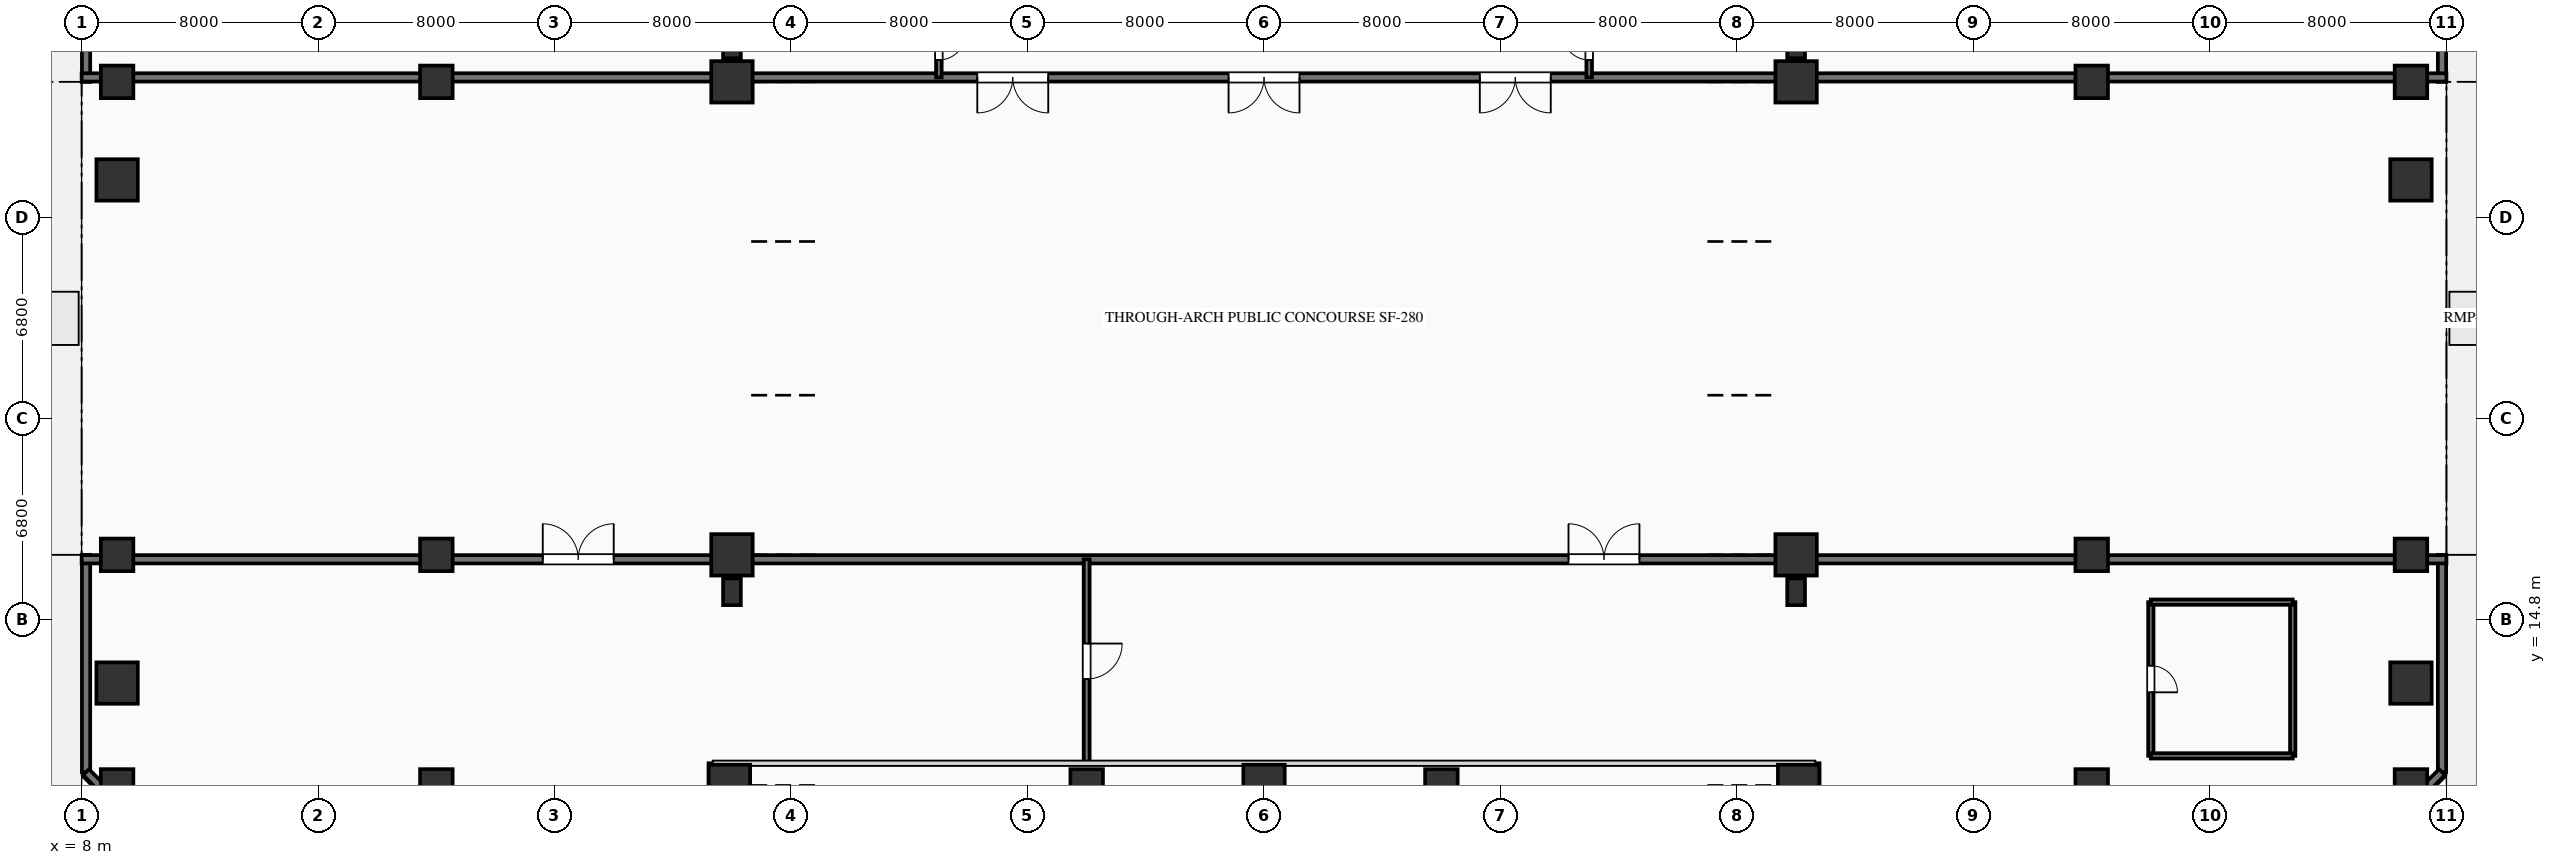
"""IFC4 building model, lengths in metres.
Left out: names, types, materials, properties, quantities, classifications, styles, units other than length and angle.
Written with IfcOpenShell. Run it as: python <this file> out.ifc"""

import sys

from ifc_helpers import new_model, si_unit, direction, frame, frame_2d, origin, origin_2d, place, context, subcontext, project, spatial, rectangle, extrude, element, fill, save


model = new_model("IFC4")
c1 = context("Model", 3, precision=1e-05, world=origin(), true_north=direction((0.0, 1.0)))
c2 = subcontext(c1, "Body", "Model", "MODEL_VIEW")
j1 = project(units=[si_unit("LENGTHUNIT", "METRE"), si_unit("PLANEANGLEUNIT", "RADIAN")], contexts=[c1])
p1 = place(None, origin())
s1 = spatial("IfcSite", under=j1, at=p1, CompositionType="ELEMENT")
p2 = place(p1, origin())
s2 = spatial("IfcBuilding", under=s1, at=p2, CompositionType="ELEMENT")
p3 = place(p2, origin())
s3 = spatial("IfcBuildingStorey", under=s2, at=p3, CompositionType="ELEMENT", Elevation=0.0)
for number, where, z_axis, x_axis in (
    (1, (9.2, 9.2, 0.0), (0.0, 0.0, 1.0), (1.0, 0.0, 0.0)),
    (2, (20.0, 9.2, 0.0), (0.0, 0.0, 1.0), (1.0, 0.0, 0.0)),
    (3, (42.0, 9.2, 0.0), (0.0, 0.0, 1.0), (1.0, 0.0, 0.0)),
    (4, (54.0, 9.2, 0.0), (0.0, 0.0, 1.0), (1.0, 0.0, 0.0)),
    (5, (76.0, 9.2, 0.0), (0.0, 0.0, 1.0), (1.0, 0.0, 0.0)),
    (6, (86.8, 9.2, 0.0), (0.0, 0.0, 1.0), (1.0, 0.0, 0.0)),
    (7, (9.2, 17.0, 0.0), (0.0, 0.0, 1.0), (1.0, 0.0, 0.0)),
    (8, (86.8, 17.0, 0.0), (0.0, 0.0, 1.0), (1.0, 0.0, 0.0)),
    (9, (9.2, 33.0, 0.0), (0.0, 0.0, 1.0), (1.0, 0.0, 0.0)),
    (10, (86.8, 33.0, 0.0), (0.0, 0.0, 1.0), (1.0, 0.0, 0.0)),
    (11, (20.0, 17.0, 0.0), (0.0, 0.0, 1.0), (1.0, 0.0, 0.0)),
):
    element("IfcColumn", number, at=place(p3, frame(where, z_axis=z_axis, x_axis=x_axis)), inside=s3, PredefinedType="COLUMN", context=c2, shape_type="SweptSolid", body=[
        extrude(rectangle(XDim=1.1, YDim=1.1, at=origin_2d()), origin(), (0.0, 0.0, 1.0), 5.72),
    ])
for number, where, z_axis, x_axis in (
    (12, (30.0, 17.0, 0.0), (0.0, 0.0, 1.0), (1.0, 0.0, 0.0)),
    (13, (66.0, 17.0, 0.0), (0.0, 0.0, 1.0), (1.0, 0.0, 0.0)),
):
    element("IfcColumn", number, at=place(p3, frame(where, z_axis=z_axis, x_axis=x_axis)), inside=s3, PredefinedType="COLUMN", context=c2, shape_type="SweptSolid", body=[
        extrude(rectangle(XDim=1.4, YDim=1.4, at=origin_2d()), origin(), (0.0, 0.0, 1.0), 5.72),
    ])
for number, where, z_axis, x_axis in (
    (14, (76.0, 17.0, 0.0), (0.0, 0.0, 1.0), (1.0, 0.0, 0.0)),
    (15, (20.0, 33.0, 0.0), (0.0, 0.0, 1.0), (1.0, 0.0, 0.0)),
):
    element("IfcColumn", number, at=place(p3, frame(where, z_axis=z_axis, x_axis=x_axis)), inside=s3, PredefinedType="COLUMN", context=c2, shape_type="SweptSolid", body=[
        extrude(rectangle(XDim=1.1, YDim=1.1, at=origin_2d()), origin(), (0.0, 0.0, 1.0), 5.72),
    ])
for number, where, z_axis, x_axis in (
    (16, (30.0, 33.0, 0.0), (0.0, 0.0, 1.0), (1.0, 0.0, 0.0)),
    (17, (66.0, 33.0, 0.0), (0.0, 0.0, 1.0), (1.0, 0.0, 0.0)),
):
    element("IfcColumn", number, at=place(p3, frame(where, z_axis=z_axis, x_axis=x_axis)), inside=s3, PredefinedType="COLUMN", context=c2, shape_type="SweptSolid", body=[
        extrude(rectangle(XDim=1.4, YDim=1.4, at=origin_2d()), origin(), (0.0, 0.0, 1.0), 5.72),
    ])
p4 = place(p3, frame((76.0, 33.0, 0.0), z_axis=(0.0, 0.0, 1.0), x_axis=(1.0, 0.0, 0.0)))
e18 = element("IfcColumn", 18, at=p4, inside=s3, PredefinedType="COLUMN", context=c2, shape_type="SweptSolid", body=[
    extrude(rectangle(XDim=1.1, YDim=1.1, at=origin_2d()), origin(), (0.0, 0.0, 1.0), 5.72),
])
p5 = place(p3, frame((9.2, 29.682, 0.0), z_axis=(0.0, 0.0, 1.0), x_axis=(1.0, 0.0, 0.0)))
e19 = element("IfcColumn", 19, at=p5, inside=s3, PredefinedType="COLUMN", context=c2, shape_type="SweptSolid", body=[
    extrude(rectangle(XDim=1.4, YDim=1.4, at=origin_2d()), origin(), (0.0, 0.0, 1.0), 6.0),
])
for number, where, z_axis, x_axis in (
    (20, (9.2, 12.663, 0.0), (0.0, 0.0, 1.0), (1.0, 0.0, 0.0)),
    (21, (29.916, 9.2, 0.0), (0.0, 0.0, 1.0), (1.0, 0.0, 0.0)),
    (22, (48.0, 9.2, 0.0), (0.0, 0.0, 1.0), (1.0, 0.0, 0.0)),
    (23, (66.084, 9.2, 0.0), (0.0, 0.0, 1.0), (1.0, 0.0, 0.0)),
    (24, (86.8, 12.663, 0.0), (0.0, 0.0, 1.0), (1.0, 0.0, 0.0)),
):
    element("IfcColumn", number, at=place(p3, frame(where, z_axis=z_axis, x_axis=x_axis)), inside=s3, PredefinedType="COLUMN", context=c2, shape_type="SweptSolid", body=[
        extrude(rectangle(XDim=1.4, YDim=1.4, at=origin_2d()), origin(), (0.0, 0.0, 1.0), 5.72),
    ])
p6 = place(p3, frame((86.8, 29.682, 0.0), z_axis=(0.0, 0.0, 1.0), x_axis=(1.0, 0.0, 0.0)))
e25 = element("IfcColumn", 25, at=p6, inside=s3, PredefinedType="COLUMN", context=c2, shape_type="SweptSolid", body=[
    extrude(rectangle(XDim=1.4, YDim=1.4, at=origin_2d()), origin(), (0.0, 0.0, 1.0), 6.0),
])
for number, where, z_axis, x_axis in (
    (26, (30.0, 15.75, 0.0), (0.0, 0.0, 1.0), (1.0, 0.0, 0.0)),
    (27, (30.0, 34.25, 0.0), (0.0, 0.0, 1.0), (1.0, 0.0, 0.0)),
    (28, (66.0, 15.75, 0.0), (0.0, 0.0, 1.0), (1.0, 0.0, 0.0)),
    (29, (66.0, 34.25, 0.0), (0.0, 0.0, 1.0), (1.0, 0.0, 0.0)),
):
    element("IfcColumn", number, at=place(p3, frame(where, z_axis=z_axis, x_axis=x_axis)), inside=s3, PredefinedType="PILASTER", context=c2, shape_type="SweptSolid", body=[
        extrude(rectangle(XDim=0.6, YDim=0.9, at=origin_2d()), origin(), (0.0, 0.0, 1.0), 5.72),
    ])
for number, where, z_axis, x_axis in (
    (30, (29.35, 8.15, 0.0), (0.0, 0.0, 1.0), (0.0, 1.0, 0.0)),
    (31, (66.65, 9.95, 0.0), (0.0, 0.0, 1.0), (0.0, -1.0, 0.0)),
):
    element("IfcWall", number, at=place(p3, frame(where, z_axis=z_axis, x_axis=x_axis)), inside=s3, PredefinedType="SOLIDWALL", context=c2, shape_type="SweptSolid", body=[
        extrude(rectangle(XDim=1.8, YDim=0.28, at=frame_2d((0.9, 0.0))), origin(), (0.0, 0.0, 1.0), 5.72),
    ])
p7 = place(p3, frame((8.15, 33.0, 0.0), z_axis=(0.0, 0.0, 1.0), x_axis=(0.0, 1.0, 0.0)))
e32 = element("IfcWall", 32, at=p7, inside=s3, PredefinedType="SOLIDWALL", context=c2, shape_type="SweptSolid", body=[
    extrude(rectangle(XDim=41.35, YDim=0.28, at=frame_2d((20.675, 0.0))), origin(), (0.0, 0.0, 1.0), 5.72),
])
p8 = place(p7, frame((33.6, 0.0, 0.0)))
e33 = element("IfcOpeningElement", 33, at=p8, cuts=e32, PredefinedType="OPENING", context=c2, shape_type="SweptSolid", body=[
    extrude(rectangle(XDim=2.4, YDim=2.6, at=frame_2d((1.2, 1.3))), frame((0.0, 0.15, 0.0), z_axis=(0.0, -1.0, 0.0), x_axis=(1.0, 0.0, 0.0)), (0.0, 0.0, 1.0), 0.3),
])
p9 = place(p7, frame((7.675, 0.0, 0.9)))
e34 = element("IfcOpeningElement", 34, at=p9, cuts=e32, PredefinedType="OPENING", context=c2, shape_type="SweptSolid", body=[
    extrude(rectangle(XDim=2.4, YDim=2.6, at=frame_2d((1.2, 1.3))), frame((0.0, 0.15, 0.0), z_axis=(0.0, -1.0, 0.0), x_axis=(1.0, 0.0, 0.0)), (0.0, 0.0, 1.0), 0.3),
])
p10 = place(p7, frame((21.225, 0.0, 0.9)))
e35 = element("IfcOpeningElement", 35, at=p10, cuts=e32, PredefinedType="OPENING", context=c2, shape_type="SweptSolid", body=[
    extrude(rectangle(XDim=2.4, YDim=2.6, at=frame_2d((1.2, 1.3))), frame((0.0, 0.15, 0.0), z_axis=(0.0, -1.0, 0.0), x_axis=(1.0, 0.0, 0.0)), (0.0, 0.0, 1.0), 0.3),
])
p11 = place(p3, frame((87.85, 74.35, 0.0), z_axis=(0.0, 0.0, 1.0), x_axis=(0.0, -1.0, 0.0)))
e36 = element("IfcWall", 36, at=p11, inside=s3, PredefinedType="SOLIDWALL", context=c2, shape_type="SweptSolid", body=[
    extrude(rectangle(XDim=41.35, YDim=0.28, at=frame_2d((20.675, 0.0))), origin(), (0.0, 0.0, 1.0), 5.72),
])
p12 = place(p11, frame((5.35, 0.0, 0.0)))
e37 = element("IfcOpeningElement", 37, at=p12, cuts=e36, PredefinedType="OPENING", context=c2, shape_type="SweptSolid", body=[
    extrude(rectangle(XDim=2.4, YDim=2.6, at=frame_2d((1.2, 1.3))), frame((0.0, 0.15, 0.0), z_axis=(0.0, -1.0, 0.0), x_axis=(1.0, 0.0, 0.0)), (0.0, 0.0, 1.0), 0.3),
])
p13 = place(p11, frame((14.15, 0.0, 0.0)))
e38 = element("IfcOpeningElement", 38, at=p13, cuts=e36, PredefinedType="OPENING", context=c2, shape_type="SweptSolid", body=[
    extrude(rectangle(XDim=4.2, YDim=4.2, at=frame_2d((2.1, 2.1))), frame((0.0, 0.15, 0.0), z_axis=(0.0, -1.0, 0.0), x_axis=(1.0, 0.0, 0.0)), (0.0, 0.0, 1.0), 0.3),
])
p14 = place(p11, frame((31.275, 0.0, 0.9)))
e39 = element("IfcOpeningElement", 39, at=p14, cuts=e36, PredefinedType="OPENING", context=c2, shape_type="SweptSolid", body=[
    extrude(rectangle(XDim=2.4, YDim=2.6, at=frame_2d((1.2, 1.3))), frame((0.0, 0.15, 0.0), z_axis=(0.0, -1.0, 0.0), x_axis=(1.0, 0.0, 0.0)), (0.0, 0.0, 1.0), 0.3),
])
for number, where, z_axis, x_axis in (
    (40, (8.15, 17.0, 0.0), (0.0, 0.0, 1.0), (0.0, -1.0, 0.0)),
    (41, (87.85, 9.65, 0.0), (0.0, 0.0, 1.0), (0.0, 1.0, 0.0)),
):
    element("IfcWall", number, at=place(p3, frame(where, z_axis=z_axis, x_axis=x_axis)), inside=s3, PredefinedType="SOLIDWALL", context=c2, shape_type="SweptSolid", body=[
        extrude(rectangle(XDim=7.35, YDim=0.28, at=frame_2d((3.675, 0.0))), origin(), (0.0, 0.0, 1.0), 5.72),
    ])
p15 = place(p3, frame((88.0, 33.15, 0.0), z_axis=(0.0, 0.0, 1.0), x_axis=(-1.0, 0.0, 0.0)))
e42 = element("IfcWall", 42, at=p15, inside=s3, PredefinedType="SOLIDWALL", context=c2, shape_type="SweptSolid", body=[
    extrude(rectangle(XDim=80.0, YDim=0.28, at=frame_2d((40.0, 0.0))), origin(), (0.0, 0.0, 1.0), 5.72),
])
p16 = place(p15, frame((47.3, 0.0, 0.0)))
e43 = element("IfcOpeningElement", 43, at=p16, cuts=e42, PredefinedType="OPENING", context=c2, shape_type="SweptSolid", body=[
    extrude(rectangle(XDim=2.4, YDim=2.6, at=frame_2d((1.2, 1.3))), frame((0.0, 0.15, 0.0), z_axis=(0.0, -1.0, 0.0), x_axis=(1.0, 0.0, 0.0)), (0.0, 0.0, 1.0), 0.3),
])
p17 = place(p15, frame((38.8, 0.0, 0.0)))
e44 = element("IfcOpeningElement", 44, at=p17, cuts=e42, PredefinedType="OPENING", context=c2, shape_type="SweptSolid", body=[
    extrude(rectangle(XDim=2.4, YDim=2.6, at=frame_2d((1.2, 1.3))), frame((0.0, 0.15, 0.0), z_axis=(0.0, -1.0, 0.0), x_axis=(1.0, 0.0, 0.0)), (0.0, 0.0, 1.0), 0.3),
])
p18 = place(p15, frame((30.3, 0.0, 0.0)))
e45 = element("IfcOpeningElement", 45, at=p18, cuts=e42, PredefinedType="OPENING", context=c2, shape_type="SweptSolid", body=[
    extrude(rectangle(XDim=2.4, YDim=2.6, at=frame_2d((1.2, 1.3))), frame((0.0, 0.15, 0.0), z_axis=(0.0, -1.0, 0.0), x_axis=(1.0, 0.0, 0.0)), (0.0, 0.0, 1.0), 0.3),
])
p19 = place(p3, frame((8.0, 16.85, 0.0), z_axis=(0.0, 0.0, 1.0), x_axis=(1.0, 0.0, 0.0)))
e46 = element("IfcWall", 46, at=p19, inside=s3, PredefinedType="SOLIDWALL", context=c2, shape_type="SweptSolid", body=[
    extrude(rectangle(XDim=80.0, YDim=0.28, at=frame_2d((40.0, 0.0))), origin(), (0.0, 0.0, 1.0), 5.72),
])
p20 = place(p19, frame((15.6, 0.0, 0.0)))
e47 = element("IfcOpeningElement", 47, at=p20, cuts=e46, PredefinedType="OPENING", context=c2, shape_type="SweptSolid", body=[
    extrude(rectangle(XDim=2.4, YDim=2.6, at=frame_2d((1.2, 1.3))), frame((0.0, 0.15, 0.0), z_axis=(0.0, -1.0, 0.0), x_axis=(1.0, 0.0, 0.0)), (0.0, 0.0, 1.0), 0.3),
])
p21 = place(p19, frame((50.3, 0.0, 0.0)))
e48 = element("IfcOpeningElement", 48, at=p21, cuts=e46, PredefinedType="OPENING", context=c2, shape_type="SweptSolid", body=[
    extrude(rectangle(XDim=2.4, YDim=2.6, at=frame_2d((1.2, 1.3))), frame((0.0, 0.15, 0.0), z_axis=(0.0, -1.0, 0.0), x_axis=(1.0, 0.0, 0.0)), (0.0, 0.0, 1.0), 0.3),
])
for number, where, z_axis, x_axis in (
    (49, (8.15, 9.65, 0.0), (0.0, 0.0, 1.0), (0.707, -0.707, 0.0)),
    (50, (86.35, 8.15, 0.0), (0.0, 0.0, 1.0), (0.707, 0.707, 0.0)),
):
    element("IfcWall", number, at=place(p3, frame(where, z_axis=z_axis, x_axis=x_axis)), inside=s3, PredefinedType="SOLIDWALL", context=c2, shape_type="SweptSolid", body=[
        extrude(rectangle(XDim=2.121, YDim=0.28, at=frame_2d((1.061, 0.0))), origin(), (0.0, 0.0, 1.0), 5.72),
    ])
p22 = place(p3, frame((42.0, 16.85, 0.0), z_axis=(0.0, 0.0, 1.0), x_axis=(0.0, -1.0, 0.0)))
e51 = element("IfcWall", 51, at=p22, inside=s3, PredefinedType="PARTITIONING", context=c2, shape_type="SweptSolid", body=[
    extrude(rectangle(XDim=6.9, YDim=0.2, at=frame_2d((3.45, 0.0))), origin(), (0.0, 0.0, 1.0), 4.92),
])
p23 = place(p22, frame((2.85, 0.0, 0.0)))
e52 = element("IfcOpeningElement", 52, at=p23, cuts=e51, PredefinedType="OPENING", context=c2, shape_type="SweptSolid", body=[
    extrude(rectangle(XDim=1.2, YDim=2.25, at=frame_2d((0.6, 1.125))), frame((0.0, 0.11, 0.0), z_axis=(0.0, -1.0, 0.0), x_axis=(1.0, 0.0, 0.0)), (0.0, 0.0, 1.0), 0.22),
])
p24 = place(p3, frame((78.0, 15.4, 0.0), z_axis=(0.0, 0.0, 1.0), x_axis=(0.0, -1.0, 0.0)))
e53 = element("IfcWall", 53, at=p24, inside=s3, PredefinedType="PLUMBINGWALL", context=c2, shape_type="SweptSolid", body=[
    extrude(rectangle(XDim=5.2, YDim=0.18, at=frame_2d((2.6, 0.0))), origin(), (0.0, 0.0, 1.0), 4.92),
])
p25 = place(p24, frame((2.15, 0.0, 0.0)))
e54 = element("IfcOpeningElement", 54, at=p25, cuts=e53, PredefinedType="OPENING", context=c2, shape_type="SweptSolid", body=[
    extrude(rectangle(XDim=0.9, YDim=2.1, at=frame_2d((0.45, 1.05))), frame((0.0, 0.1, 0.0), z_axis=(0.0, -1.0, 0.0), x_axis=(1.0, 0.0, 0.0)), (0.0, 0.0, 1.0), 0.2),
])
p26 = place(p3, frame((82.8, 10.2, 0.0), z_axis=(0.0, 0.0, 1.0), x_axis=(0.0, 1.0, 0.0)))
e55 = element("IfcWall", 55, at=p26, inside=s3, PredefinedType="PLUMBINGWALL", context=c2, shape_type="SweptSolid", body=[
    extrude(rectangle(XDim=5.2, YDim=0.18, at=frame_2d((2.6, 0.0))), origin(), (0.0, 0.0, 1.0), 4.92),
])
for number, where, z_axis, x_axis in (
    (56, (78.0, 10.2, 0.0), (0.0, 0.0, 1.0), (1.0, 0.0, 0.0)),
    (57, (82.8, 15.4, 0.0), (0.0, 0.0, 1.0), (-1.0, 0.0, 0.0)),
):
    element("IfcWall", number, at=place(p3, frame(where, z_axis=z_axis, x_axis=x_axis)), inside=s3, PredefinedType="PLUMBINGWALL", context=c2, shape_type="SweptSolid", body=[
        extrude(rectangle(XDim=4.8, YDim=0.18, at=frame_2d((2.4, 0.0))), origin(), (0.0, 0.0, 1.0), 4.92),
    ])
p27 = place(p3, frame((37.0, 35.232, 0.0), z_axis=(0.0, 0.0, 1.0), x_axis=(0.0, -1.0, 0.0)))
e58 = element("IfcWall", 58, at=p27, inside=s3, PredefinedType="PARTITIONING", context=c2, shape_type="SweptSolid", body=[
    extrude(rectangle(XDim=2.082, YDim=0.19, at=frame_2d((1.041, 0.0))), origin(), (0.0, 0.0, 1.0), 4.92),
])
p28 = place(p27, frame((0.591, 0.0, 0.0)))
e59 = element("IfcOpeningElement", 59, at=p28, cuts=e58, PredefinedType="OPENING", context=c2, shape_type="SweptSolid", body=[
    extrude(rectangle(XDim=0.9, YDim=2.15, at=frame_2d((0.45, 1.075))), frame((0.0, 0.105, 0.0), z_axis=(0.0, -1.0, 0.0), x_axis=(1.0, 0.0, 0.0)), (0.0, 0.0, 1.0), 0.21),
])
p29 = place(p3, frame((59.0, 33.15, 0.0), z_axis=(0.0, 0.0, 1.0), x_axis=(0.0, 1.0, 0.0)))
e60 = element("IfcWall", 60, at=p29, inside=s3, PredefinedType="PARTITIONING", context=c2, shape_type="SweptSolid", body=[
    extrude(rectangle(XDim=2.082, YDim=0.19, at=frame_2d((1.041, 0.0))), origin(), (0.0, 0.0, 1.0), 4.92),
])
p30 = place(p29, frame((0.591, 0.0, 0.0)))
e61 = element("IfcOpeningElement", 61, at=p30, cuts=e60, PredefinedType="OPENING", context=c2, shape_type="SweptSolid", body=[
    extrude(rectangle(XDim=0.9, YDim=2.15, at=frame_2d((0.45, 1.075))), frame((0.0, 0.105, 0.0), z_axis=(0.0, -1.0, 0.0), x_axis=(1.0, 0.0, 0.0)), (0.0, 0.0, 1.0), 0.21),
])
p31 = place(p16, origin())
e62 = element("IfcDoor", 62, at=p31, inside=s3, OperationType="DOUBLE_DOOR_SINGLE_SWING", PredefinedType="DOOR", context=c2, shape_type="SweptSolid", body=[
    extrude(rectangle(XDim=2.4, YDim=2.6, at=frame_2d((1.2, 1.3))), frame((0.0, 0.025, 0.0), z_axis=(0.0, -1.0, 0.0), x_axis=(1.0, 0.0, 0.0)), (0.0, 0.0, 1.0), 0.05),
])
fill(e43, e62)
p32 = place(p17, origin())
e63 = element("IfcDoor", 63, at=p32, inside=s3, OperationType="DOUBLE_DOOR_SINGLE_SWING", PredefinedType="DOOR", context=c2, shape_type="SweptSolid", body=[
    extrude(rectangle(XDim=2.4, YDim=2.6, at=frame_2d((1.2, 1.3))), frame((0.0, 0.025, 0.0), z_axis=(0.0, -1.0, 0.0), x_axis=(1.0, 0.0, 0.0)), (0.0, 0.0, 1.0), 0.05),
])
fill(e44, e63)
p33 = place(p18, origin())
e64 = element("IfcDoor", 64, at=p33, inside=s3, OperationType="DOUBLE_DOOR_SINGLE_SWING", PredefinedType="DOOR", context=c2, shape_type="SweptSolid", body=[
    extrude(rectangle(XDim=2.4, YDim=2.6, at=frame_2d((1.2, 1.3))), frame((0.0, 0.025, 0.0), z_axis=(0.0, -1.0, 0.0), x_axis=(1.0, 0.0, 0.0)), (0.0, 0.0, 1.0), 0.05),
])
fill(e45, e64)
p34 = place(p20, origin())
e65 = element("IfcDoor", 65, at=p34, inside=s3, OperationType="DOUBLE_DOOR_SINGLE_SWING", PredefinedType="DOOR", context=c2, shape_type="SweptSolid", body=[
    extrude(rectangle(XDim=2.4, YDim=2.6, at=frame_2d((1.2, 1.3))), frame((0.0, 0.025, 0.0), z_axis=(0.0, -1.0, 0.0), x_axis=(1.0, 0.0, 0.0)), (0.0, 0.0, 1.0), 0.05),
])
fill(e47, e65)
p35 = place(p21, origin())
e66 = element("IfcDoor", 66, at=p35, inside=s3, OperationType="DOUBLE_DOOR_SINGLE_SWING", PredefinedType="DOOR", context=c2, shape_type="SweptSolid", body=[
    extrude(rectangle(XDim=2.4, YDim=2.6, at=frame_2d((1.2, 1.3))), frame((0.0, 0.025, 0.0), z_axis=(0.0, -1.0, 0.0), x_axis=(1.0, 0.0, 0.0)), (0.0, 0.0, 1.0), 0.05),
])
fill(e48, e66)
p36 = place(p23, origin())
e67 = element("IfcDoor", 67, at=p36, inside=s3, OperationType="SINGLE_SWING_LEFT", PredefinedType="DOOR", context=c2, shape_type="SweptSolid", body=[
    extrude(rectangle(XDim=1.2, YDim=2.25, at=frame_2d((0.6, 1.125))), frame((0.0, 0.025, 0.0), z_axis=(0.0, -1.0, 0.0), x_axis=(1.0, 0.0, 0.0)), (0.0, 0.0, 1.0), 0.05),
])
fill(e52, e67)
p37 = place(p25, origin())
e68 = element("IfcDoor", 68, at=p37, inside=s3, OperationType="SINGLE_SWING_RIGHT", PredefinedType="DOOR", context=c2, shape_type="SweptSolid", body=[
    extrude(rectangle(XDim=0.9, YDim=2.1, at=frame_2d((0.45, 1.05))), frame((0.0, 0.025, 0.0), z_axis=(0.0, -1.0, 0.0), x_axis=(1.0, 0.0, 0.0)), (0.0, 0.0, 1.0), 0.05),
])
fill(e54, e68)
p38 = place(p28, origin())
e69 = element("IfcDoor", 69, at=p38, inside=s3, OperationType="SINGLE_SWING_LEFT", PredefinedType="DOOR", context=c2, shape_type="SweptSolid", body=[
    extrude(rectangle(XDim=0.9, YDim=2.15, at=frame_2d((0.45, 1.075))), frame((0.0, 0.025, 0.0), z_axis=(0.0, -1.0, 0.0), x_axis=(1.0, 0.0, 0.0)), (0.0, 0.0, 1.0), 0.05),
])
fill(e59, e69)
p39 = place(p30, origin())
e70 = element("IfcDoor", 70, at=p39, inside=s3, OperationType="SINGLE_SWING_RIGHT", PredefinedType="DOOR", context=c2, shape_type="SweptSolid", body=[
    extrude(rectangle(XDim=0.9, YDim=2.15, at=frame_2d((0.45, 1.075))), frame((0.0, 0.025, 0.0), z_axis=(0.0, -1.0, 0.0), x_axis=(1.0, 0.0, 0.0)), (0.0, 0.0, 1.0), 0.05),
])
fill(e61, e70)
save(model, sys.argv[1])
